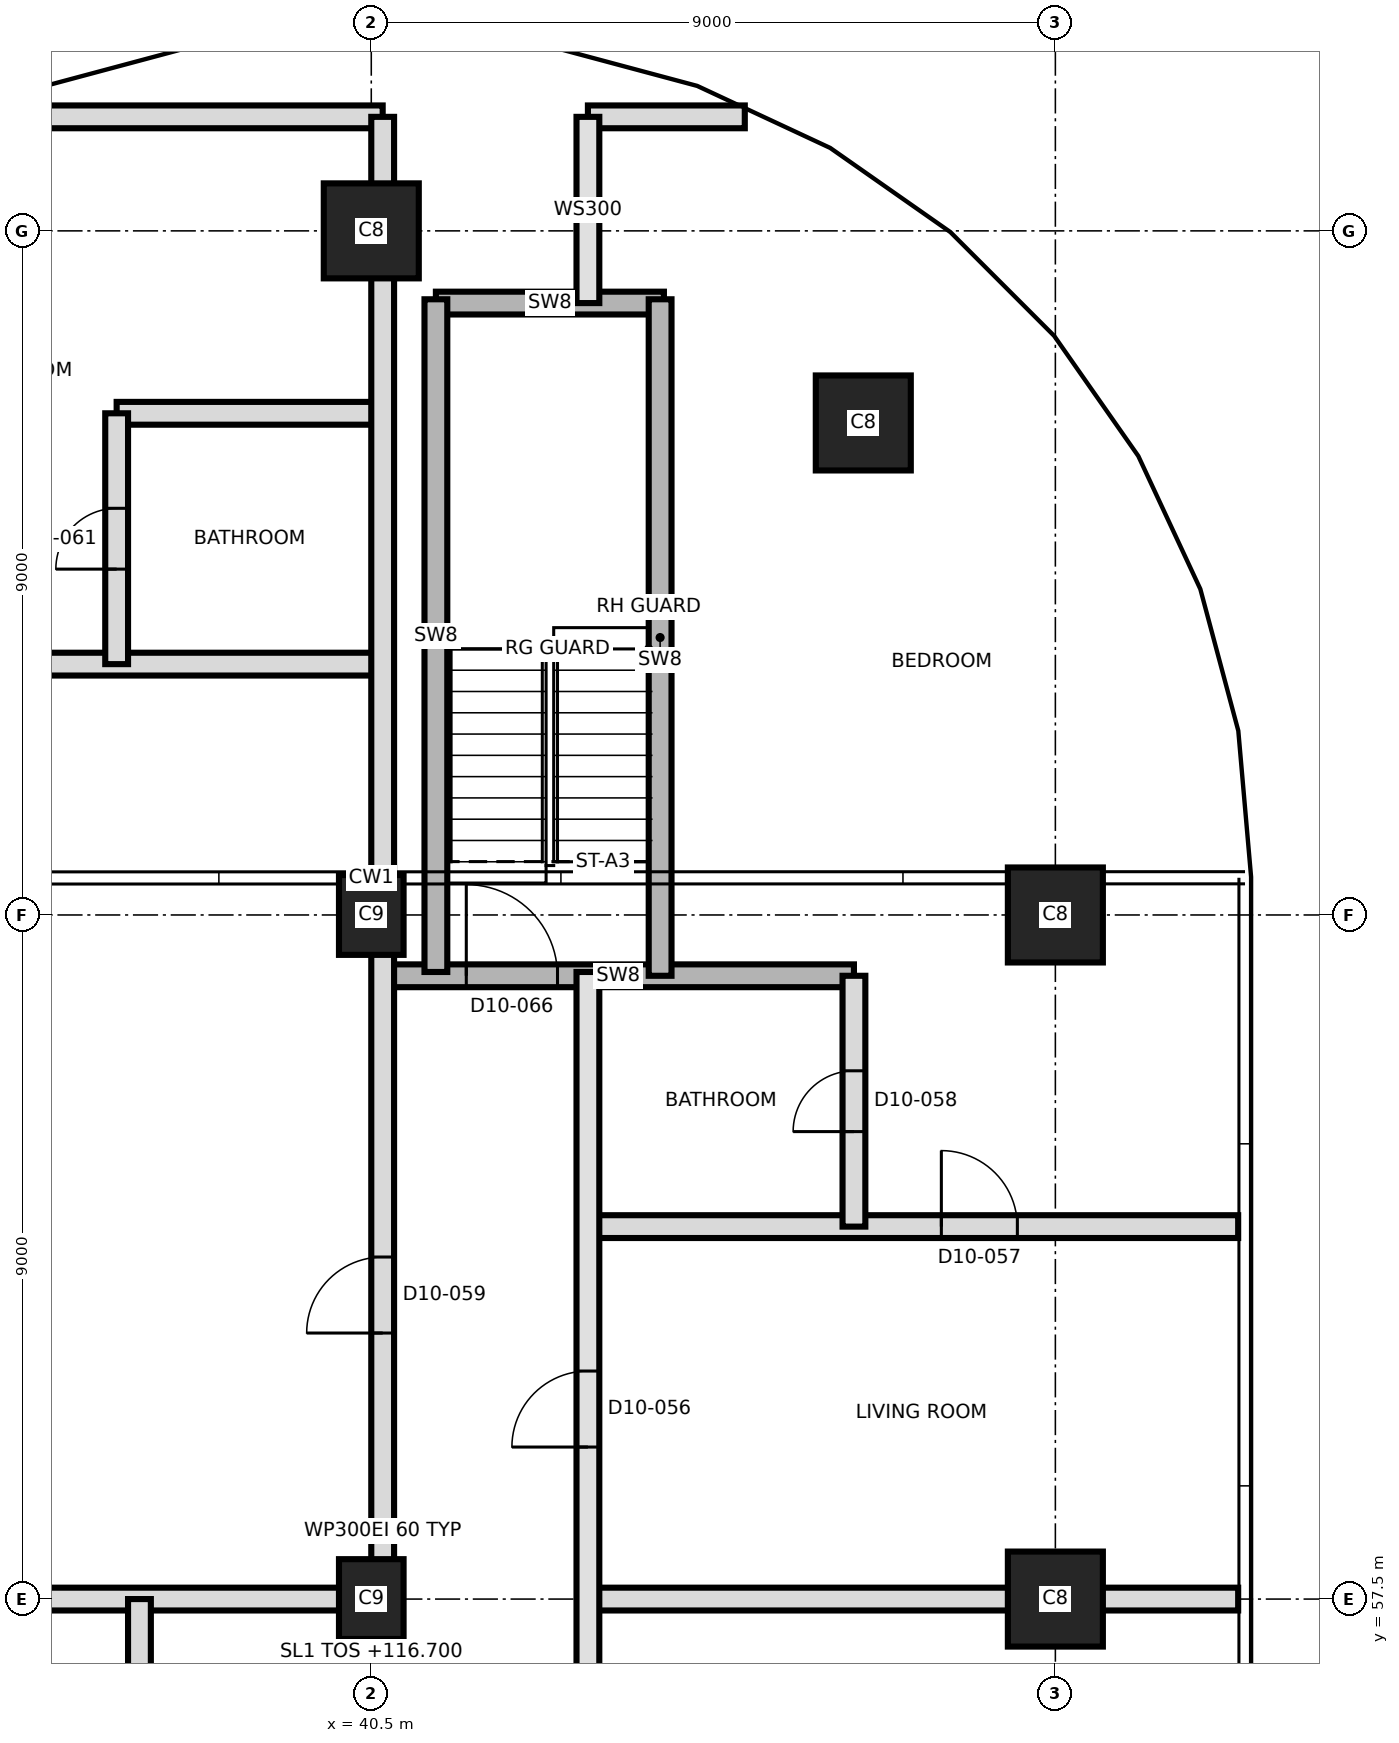
"""IFC4 building model, lengths in metres.
Left out: names, types, materials, properties, quantities, classifications, styles, units other than length and angle.
Written with IfcOpenShell. Run it as: python <this file> out.ifc"""

import sys

from ifc_helpers import new_model, si_unit, direction, frame, frame_2d, origin, origin_2d, place, context, subcontext, project, spatial, rectangle, extrude, element, fill, save


model = new_model("IFC4")
c1 = context("Model", 3, precision=1e-05, world=origin(), true_north=direction((0.0, 1.0)))
c2 = subcontext(c1, "Body", "Model", "MODEL_VIEW")
j1 = project(units=[si_unit("LENGTHUNIT", "METRE"), si_unit("PLANEANGLEUNIT", "RADIAN")], contexts=[c1])
p1 = place(None, origin())
s1 = spatial("IfcSite", under=j1, at=p1, CompositionType="ELEMENT")
p2 = place(p1, origin())
s2 = spatial("IfcBuilding", under=s1, at=p2, CompositionType="ELEMENT")
p3 = place(p2, frame((0.0, 0.0, 116.7)))
s3 = spatial("IfcBuildingStorey", under=s2, at=p3, CompositionType="ELEMENT", Elevation=116.7)
p4 = place(p3, frame((40.5, 57.5, 0.0), z_axis=(0.0, 0.0, 1.0), x_axis=(0.0, 1.0, 0.0)))
e1 = element("IfcColumn", 1, at=p4, inside=s3, PredefinedType="COLUMN", context=c2, shape_type="SweptSolid", body=[
    extrude(rectangle(XDim=1.05, YDim=0.85, at=origin_2d()), origin(), (0.0, 0.0, 1.0), 3.7),
])
p5 = place(p3, frame((49.5, 57.5, 0.0), z_axis=(0.0, 0.0, 1.0), x_axis=(1.0, 0.0, 0.0)))
e2 = element("IfcColumn", 2, at=p5, inside=s3, PredefinedType="COLUMN", context=c2, shape_type="SweptSolid", body=[
    extrude(rectangle(XDim=1.25, YDim=1.25, at=origin_2d()), origin(), (0.0, 0.0, 1.0), 3.7),
])
p6 = place(p3, frame((40.5, 66.5, 0.0), z_axis=(0.0, 0.0, 1.0), x_axis=(0.0, 1.0, 0.0)))
e3 = element("IfcColumn", 3, at=p6, inside=s3, PredefinedType="COLUMN", context=c2, shape_type="SweptSolid", body=[
    extrude(rectangle(XDim=1.05, YDim=0.85, at=origin_2d()), origin(), (0.0, 0.0, 1.0), 3.7),
])
for number, where, z_axis, x_axis in (
    (4, (49.5, 66.5, 0.0), (0.0, 0.0, 1.0), (1.0, 0.0, 0.0)),
    (5, (46.973, 72.973, 0.0), (0.0, 0.0, 1.0), (1.0, 0.0, 0.0)),
    (6, (40.5, 75.5, 0.0), (0.0, 0.0, 1.0), (1.0, 0.0, 0.0)),
):
    element("IfcColumn", number, at=place(p3, frame(where, z_axis=z_axis, x_axis=x_axis)), inside=s3, PredefinedType="COLUMN", context=c2, shape_type="SweptSolid", body=[
        extrude(rectangle(XDim=1.25, YDim=1.25, at=origin_2d()), origin(), (0.0, 0.0, 1.0), 3.7),
    ])
p7 = place(p3, frame((29.275, 57.5, 0.0), z_axis=(0.0, 0.0, 1.0), x_axis=(1.0, 0.0, 0.0)))
e7 = element("IfcWall", 7, at=p7, inside=s3, PredefinedType="PARTITIONING", context=c2, shape_type="SweptSolid", body=[
    extrude(rectangle(XDim=11.375, YDim=0.3, at=frame_2d((5.688, 0.0))), origin(), (0.0, 0.0, 1.0), 3.4),
])
p8 = place(p3, frame((43.35, 57.5, 0.0), z_axis=(0.0, 0.0, 1.0), x_axis=(1.0, 0.0, 0.0)))
e8 = element("IfcWall", 8, at=p8, inside=s3, PredefinedType="PARTITIONING", context=c2, shape_type="SweptSolid", body=[
    extrude(rectangle(XDim=8.555, YDim=0.3, at=frame_2d((4.277, 0.0))), origin(), (0.0, 0.0, 1.0), 3.4),
])
p9 = place(p3, frame((43.35, 62.4, 0.0), z_axis=(0.0, 0.0, 1.0), x_axis=(1.0, 0.0, 0.0)))
e9 = element("IfcWall", 9, at=p9, inside=s3, PredefinedType="PARTITIONING", context=c2, shape_type="SweptSolid", body=[
    extrude(rectangle(XDim=8.555, YDim=0.3, at=frame_2d((4.277, 0.0))), origin(), (0.0, 0.0, 1.0), 3.4),
])
p10 = place(p9, frame((4.65, 0.0, 0.0)))
e10 = element("IfcOpeningElement", 10, at=p10, cuts=e9, PredefinedType="OPENING", context=c2, shape_type="SweptSolid", body=[
    extrude(rectangle(XDim=1.0, YDim=2.1, at=frame_2d((0.5, 1.05))), frame((0.0, 0.16, 0.0), z_axis=(0.0, -1.0, 0.0), x_axis=(1.0, 0.0, 0.0)), (0.0, 0.0, 1.0), 0.32),
])
p11 = place(p3, frame((40.65, 65.7, 0.0), z_axis=(0.0, 0.0, 1.0), x_axis=(1.0, 0.0, 0.0)))
e11 = element("IfcWall", 11, at=p11, inside=s3, PredefinedType="SHEAR", context=c2, shape_type="SweptSolid", body=[
    extrude(rectangle(XDim=6.2, YDim=0.3, at=frame_2d((3.1, 0.0))), origin(), (0.0, 0.0, 1.0), 3.4),
])
p12 = place(p11, frame((1.1, 0.0, 0.0)))
e12 = element("IfcOpeningElement", 12, at=p12, cuts=e11, PredefinedType="OPENING", context=c2, shape_type="SweptSolid", body=[
    extrude(rectangle(XDim=1.2, YDim=2.1, at=frame_2d((0.6, 1.05))), frame((0.0, 0.16, 0.0), z_axis=(0.0, -1.0, 0.0), x_axis=(1.0, 0.0, 0.0)), (0.0, 0.0, 1.0), 0.32),
])
p13 = place(p3, frame((29.442, 69.8, 0.0), z_axis=(0.0, 0.0, 1.0), x_axis=(1.0, 0.0, 0.0)))
e13 = element("IfcWall", 13, at=p13, inside=s3, PredefinedType="PARTITIONING", context=c2, shape_type="SweptSolid", body=[
    extrude(rectangle(XDim=11.208, YDim=0.3, at=frame_2d((5.604, 0.0))), origin(), (0.0, 0.0, 1.0), 3.4),
])
p14 = place(p13, frame((5.558, 0.0, 0.0)))
e14 = element("IfcOpeningElement", 14, at=p14, cuts=e13, PredefinedType="OPENING", context=c2, shape_type="SweptSolid", body=[
    extrude(rectangle(XDim=1.0, YDim=2.1, at=frame_2d((0.5, 1.05))), frame((0.0, 0.16, 0.0), z_axis=(0.0, -1.0, 0.0), x_axis=(1.0, 0.0, 0.0)), (0.0, 0.0, 1.0), 0.32),
])
p15 = place(p3, frame((37.15, 73.1, 0.0), z_axis=(0.0, 0.0, 1.0), x_axis=(1.0, 0.0, 0.0)))
e15 = element("IfcWall", 15, at=p15, inside=s3, PredefinedType="PARTITIONING", context=c2, shape_type="SweptSolid", body=[
    extrude(rectangle(XDim=3.5, YDim=0.3, at=frame_2d((1.75, 0.0))), origin(), (0.0, 0.0, 1.0), 3.4),
])
p16 = place(p3, frame((41.35, 74.55, 0.0), z_axis=(0.0, 0.0, 1.0), x_axis=(1.0, 0.0, 0.0)))
e16 = element("IfcWall", 16, at=p16, inside=s3, PredefinedType="SHEAR", context=c2, shape_type="SweptSolid", body=[
    extrude(rectangle(XDim=3.0, YDim=0.3, at=frame_2d((1.5, 0.0))), origin(), (0.0, 0.0, 1.0), 3.4),
])
p17 = place(p3, frame((35.586, 77.0, 0.0), z_axis=(0.0, 0.0, 1.0), x_axis=(1.0, 0.0, 0.0)))
e17 = element("IfcWall", 17, at=p17, inside=s3, PredefinedType="PARTITIONING", context=c2, shape_type="SweptSolid", body=[
    extrude(rectangle(XDim=5.064, YDim=0.3, at=frame_2d((2.532, 0.0))), origin(), (0.0, 0.0, 1.0), 3.4),
])
p18 = place(p3, frame((43.35, 77.0, 0.0), z_axis=(0.0, 0.0, 1.0), x_axis=(1.0, 0.0, 0.0)))
e18 = element("IfcWall", 18, at=p18, inside=s3, PredefinedType="PARTITIONING", context=c2, shape_type="SweptSolid", body=[
    extrude(rectangle(XDim=2.064, YDim=0.3, at=frame_2d((1.032, 0.0))), origin(), (0.0, 0.0, 1.0), 3.4),
])
p19 = place(p3, frame((37.15, 69.8, 0.0), z_axis=(0.0, 0.0, 1.0), x_axis=(0.0, 1.0, 0.0)))
e19 = element("IfcWall", 19, at=p19, inside=s3, PredefinedType="PARTITIONING", context=c2, shape_type="SweptSolid", body=[
    extrude(rectangle(XDim=3.3, YDim=0.3, at=frame_2d((1.65, 0.0))), origin(), (0.0, 0.0, 1.0), 3.4),
])
p20 = place(p19, frame((1.25, 0.0, 0.0)))
e20 = element("IfcOpeningElement", 20, at=p20, cuts=e19, PredefinedType="OPENING", context=c2, shape_type="SweptSolid", body=[
    extrude(rectangle(XDim=0.8, YDim=2.1, at=frame_2d((0.4, 1.05))), frame((0.0, 0.16, 0.0), z_axis=(0.0, -1.0, 0.0), x_axis=(1.0, 0.0, 0.0)), (0.0, 0.0, 1.0), 0.32),
])
p21 = place(p3, frame((37.45, 54.8, 0.0), z_axis=(0.0, 0.0, 1.0), x_axis=(0.0, 1.0, 0.0)))
e21 = element("IfcWall", 21, at=p21, inside=s3, PredefinedType="PARTITIONING", context=c2, shape_type="SweptSolid", body=[
    extrude(rectangle(XDim=2.7, YDim=0.3, at=frame_2d((1.35, 0.0))), origin(), (0.0, 0.0, 1.0), 3.4),
])
p22 = place(p21, frame((0.95, 0.0, 0.0)))
e22 = element("IfcOpeningElement", 22, at=p22, cuts=e21, PredefinedType="OPENING", context=c2, shape_type="SweptSolid", body=[
    extrude(rectangle(XDim=0.8, YDim=2.1, at=frame_2d((0.4, 1.05))), frame((0.0, 0.16, 0.0), z_axis=(0.0, -1.0, 0.0), x_axis=(1.0, 0.0, 0.0)), (0.0, 0.0, 1.0), 0.32),
])
p23 = place(p3, frame((40.65, 39.8, 0.0), z_axis=(0.0, 0.0, 1.0), x_axis=(0.0, 1.0, 0.0)))
e23 = element("IfcWall", 23, at=p23, inside=s3, PredefinedType="PARTITIONING", context=c2, shape_type="SweptSolid", body=[
    extrude(rectangle(XDim=37.2, YDim=0.3, at=frame_2d((18.6, 0.0))), origin(), (0.0, 0.0, 1.0), 3.4),
])
p24 = place(p23, frame((0.835, 0.0, 0.0)))
e24 = element("IfcOpeningElement", 24, at=p24, cuts=e23, PredefinedType="OPENING", context=c2, shape_type="SweptSolid", body=[
    extrude(rectangle(XDim=1.2, YDim=2.1, at=frame_2d((0.6, 1.05))), frame((0.0, 0.16, 0.0), z_axis=(0.0, -1.0, 0.0), x_axis=(1.0, 0.0, 0.0)), (0.0, 0.0, 1.0), 0.32),
])
p25 = place(p23, frame((4.085, 0.0, 0.0)))
e25 = element("IfcOpeningElement", 25, at=p25, cuts=e23, PredefinedType="OPENING", context=c2, shape_type="SweptSolid", body=[
    extrude(rectangle(XDim=1.0, YDim=2.1, at=frame_2d((0.5, 1.05))), frame((0.0, 0.16, 0.0), z_axis=(0.0, -1.0, 0.0), x_axis=(1.0, 0.0, 0.0)), (0.0, 0.0, 1.0), 0.32),
])
p26 = place(p23, frame((9.835, 0.0, 0.0)))
e26 = element("IfcOpeningElement", 26, at=p26, cuts=e23, PredefinedType="OPENING", context=c2, shape_type="SweptSolid", body=[
    extrude(rectangle(XDim=1.2, YDim=2.1, at=frame_2d((0.6, 1.05))), frame((0.0, 0.16, 0.0), z_axis=(0.0, -1.0, 0.0), x_axis=(1.0, 0.0, 0.0)), (0.0, 0.0, 1.0), 0.32),
])
p27 = place(p23, frame((13.085, 0.0, 0.0)))
e27 = element("IfcOpeningElement", 27, at=p27, cuts=e23, PredefinedType="OPENING", context=c2, shape_type="SweptSolid", body=[
    extrude(rectangle(XDim=1.0, YDim=2.1, at=frame_2d((0.5, 1.05))), frame((0.0, 0.16, 0.0), z_axis=(0.0, -1.0, 0.0), x_axis=(1.0, 0.0, 0.0)), (0.0, 0.0, 1.0), 0.32),
])
p28 = place(p23, frame((21.2, 0.0, 0.0)))
e28 = element("IfcOpeningElement", 28, at=p28, cuts=e23, PredefinedType="OPENING", context=c2, shape_type="SweptSolid", body=[
    extrude(rectangle(XDim=1.0, YDim=2.4, at=frame_2d((0.5, 1.2))), frame((0.0, 0.16, 0.0), z_axis=(0.0, -1.0, 0.0), x_axis=(1.0, 0.0, 0.0)), (0.0, 0.0, 1.0), 0.32),
])
p29 = place(p3, frame((41.35, 65.75, 0.0), z_axis=(0.0, 0.0, 1.0), x_axis=(0.0, 1.0, 0.0)))
e29 = element("IfcWall", 29, at=p29, inside=s3, PredefinedType="SHEAR", context=c2, shape_type="SweptSolid", body=[
    extrude(rectangle(XDim=8.85, YDim=0.3, at=frame_2d((4.425, 0.0))), origin(), (0.0, 0.0, 1.0), 3.4),
])
p30 = place(p3, frame((43.35, 39.8, 0.0), z_axis=(0.0, 0.0, 1.0), x_axis=(0.0, 1.0, 0.0)))
e30 = element("IfcWall", 30, at=p30, inside=s3, PredefinedType="SOLIDWALL", context=c2, shape_type="SweptSolid", body=[
    extrude(rectangle(XDim=25.95, YDim=0.3, at=frame_2d((12.975, 0.0))), origin(), (0.0, 0.0, 1.0), 3.4),
])
p31 = place(p30, frame((0.73, 0.0, 0.0)))
e31 = element("IfcOpeningElement", 31, at=p31, cuts=e30, PredefinedType="OPENING", context=c2, shape_type="SweptSolid", body=[
    extrude(rectangle(XDim=1.0, YDim=2.1, at=frame_2d((0.5, 1.05))), frame((0.0, 0.16, 0.0), z_axis=(0.0, -1.0, 0.0), x_axis=(1.0, 0.0, 0.0)), (0.0, 0.0, 1.0), 0.32),
])
p32 = place(p30, frame((6.58, 0.0, 0.0)))
e32 = element("IfcOpeningElement", 32, at=p32, cuts=e30, PredefinedType="OPENING", context=c2, shape_type="SweptSolid", body=[
    extrude(rectangle(XDim=1.0, YDim=2.1, at=frame_2d((0.5, 1.05))), frame((0.0, 0.16, 0.0), z_axis=(0.0, -1.0, 0.0), x_axis=(1.0, 0.0, 0.0)), (0.0, 0.0, 1.0), 0.32),
])
p33 = place(p30, frame((11.75, 0.0, 0.0)))
e33 = element("IfcOpeningElement", 33, at=p33, cuts=e30, PredefinedType="OPENING", context=c2, shape_type="SweptSolid", body=[
    extrude(rectangle(XDim=1.0, YDim=2.1, at=frame_2d((0.5, 1.05))), frame((0.0, 0.16, 0.0), z_axis=(0.0, -1.0, 0.0), x_axis=(1.0, 0.0, 0.0)), (0.0, 0.0, 1.0), 0.32),
])
p34 = place(p30, frame((14.7, 0.0, 0.0)))
e34 = element("IfcOpeningElement", 34, at=p34, cuts=e30, PredefinedType="OPENING", context=c2, shape_type="SweptSolid", body=[
    extrude(rectangle(XDim=1.4, YDim=2.1, at=frame_2d((0.7, 1.05))), frame((0.0, 0.16, 0.0), z_axis=(0.0, -1.0, 0.0), x_axis=(1.0, 0.0, 0.0)), (0.0, 0.0, 1.0), 0.32),
])
p35 = place(p30, frame((19.7, 0.0, 0.0)))
e35 = element("IfcOpeningElement", 35, at=p35, cuts=e30, PredefinedType="OPENING", context=c2, shape_type="SweptSolid", body=[
    extrude(rectangle(XDim=1.0, YDim=2.4, at=frame_2d((0.5, 1.2))), frame((0.0, 0.16, 0.0), z_axis=(0.0, -1.0, 0.0), x_axis=(1.0, 0.0, 0.0)), (0.0, 0.0, 1.0), 0.32),
])
p36 = place(p3, frame((43.35, 74.55, 0.0), z_axis=(0.0, 0.0, 1.0), x_axis=(0.0, 1.0, 0.0)))
e36 = element("IfcWall", 36, at=p36, inside=s3, PredefinedType="SOLIDWALL", context=c2, shape_type="SweptSolid", body=[
    extrude(rectangle(XDim=2.45, YDim=0.3, at=frame_2d((1.225, 0.0))), origin(), (0.0, 0.0, 1.0), 3.4),
])
p37 = place(p3, frame((44.3, 65.7, 0.0), z_axis=(0.0, 0.0, 1.0), x_axis=(0.0, 1.0, 0.0)))
e37 = element("IfcWall", 37, at=p37, inside=s3, PredefinedType="SHEAR", context=c2, shape_type="SweptSolid", body=[
    extrude(rectangle(XDim=8.9, YDim=0.3, at=frame_2d((4.45, 0.0))), origin(), (0.0, 0.0, 1.0), 3.4),
])
p38 = place(p3, frame((46.85, 62.4, 0.0), z_axis=(0.0, 0.0, 1.0), x_axis=(0.0, 1.0, 0.0)))
e38 = element("IfcWall", 38, at=p38, inside=s3, PredefinedType="PARTITIONING", context=c2, shape_type="SweptSolid", body=[
    extrude(rectangle(XDim=3.3, YDim=0.3, at=frame_2d((1.65, 0.0))), origin(), (0.0, 0.0, 1.0), 3.4),
])
p39 = place(p38, frame((1.25, 0.0, 0.0)))
e39 = element("IfcOpeningElement", 39, at=p39, cuts=e38, PredefinedType="OPENING", context=c2, shape_type="SweptSolid", body=[
    extrude(rectangle(XDim=0.8, YDim=2.1, at=frame_2d((0.4, 1.05))), frame((0.0, 0.16, 0.0), z_axis=(0.0, -1.0, 0.0), x_axis=(1.0, 0.0, 0.0)), (0.0, 0.0, 1.0), 0.32),
])
p40 = place(p35, origin())
e40 = element("IfcDoor", 40, at=p40, inside=s3, OperationType="SINGLE_SWING_LEFT", PredefinedType="DOOR", context=c2, shape_type="SweptSolid", body=[
    extrude(rectangle(XDim=1.0, YDim=2.4, at=frame_2d((0.5, 1.2))), frame((0.0, 0.025, 0.0), z_axis=(0.0, -1.0, 0.0), x_axis=(1.0, 0.0, 0.0)), (0.0, 0.0, 1.0), 0.05),
])
fill(e35, e40)
p41 = place(p10, origin())
e41 = element("IfcDoor", 41, at=p41, inside=s3, OperationType="SINGLE_SWING_LEFT", PredefinedType="DOOR", context=c2, shape_type="SweptSolid", body=[
    extrude(rectangle(XDim=1.0, YDim=2.1, at=frame_2d((0.5, 1.05))), frame((0.0, 0.025, 0.0), z_axis=(0.0, -1.0, 0.0), x_axis=(1.0, 0.0, 0.0)), (0.0, 0.0, 1.0), 0.05),
])
fill(e10, e41)
p42 = place(p39, origin())
e42 = element("IfcDoor", 42, at=p42, inside=s3, OperationType="SINGLE_SWING_RIGHT", PredefinedType="DOOR", context=c2, shape_type="SweptSolid", body=[
    extrude(rectangle(XDim=0.8, YDim=2.1, at=frame_2d((0.4, 1.05))), frame((0.0, 0.025, 0.0), z_axis=(0.0, -1.0, 0.0), x_axis=(1.0, 0.0, 0.0)), (0.0, 0.0, 1.0), 0.05),
])
fill(e39, e42)
p43 = place(p28, origin())
e43 = element("IfcDoor", 43, at=p43, inside=s3, OperationType="SINGLE_SWING_LEFT", PredefinedType="DOOR", context=c2, shape_type="SweptSolid", body=[
    extrude(rectangle(XDim=1.0, YDim=2.4, at=frame_2d((0.5, 1.2))), frame((0.0, 0.025, 0.0), z_axis=(0.0, -1.0, 0.0), x_axis=(1.0, 0.0, 0.0)), (0.0, 0.0, 1.0), 0.05),
])
fill(e28, e43)
p44 = place(p20, origin())
e44 = element("IfcDoor", 44, at=p44, inside=s3, OperationType="SINGLE_SWING_RIGHT", PredefinedType="DOOR", context=c2, shape_type="SweptSolid", body=[
    extrude(rectangle(XDim=0.8, YDim=2.1, at=frame_2d((0.4, 1.05))), frame((0.0, 0.025, 0.0), z_axis=(0.0, -1.0, 0.0), x_axis=(1.0, 0.0, 0.0)), (0.0, 0.0, 1.0), 0.05),
])
fill(e20, e44)
p45 = place(p12, origin())
e45 = element("IfcDoor", 45, at=p45, inside=s3, OperationType="SINGLE_SWING_RIGHT", PredefinedType="DOOR", context=c2, shape_type="SweptSolid", body=[
    extrude(rectangle(XDim=1.2, YDim=2.1, at=frame_2d((0.6, 1.05))), frame((0.0, 0.025, 0.0), z_axis=(0.0, -1.0, 0.0), x_axis=(1.0, 0.0, 0.0)), (0.0, 0.0, 1.0), 0.05),
])
fill(e12, e45)
save(model, sys.argv[1])
